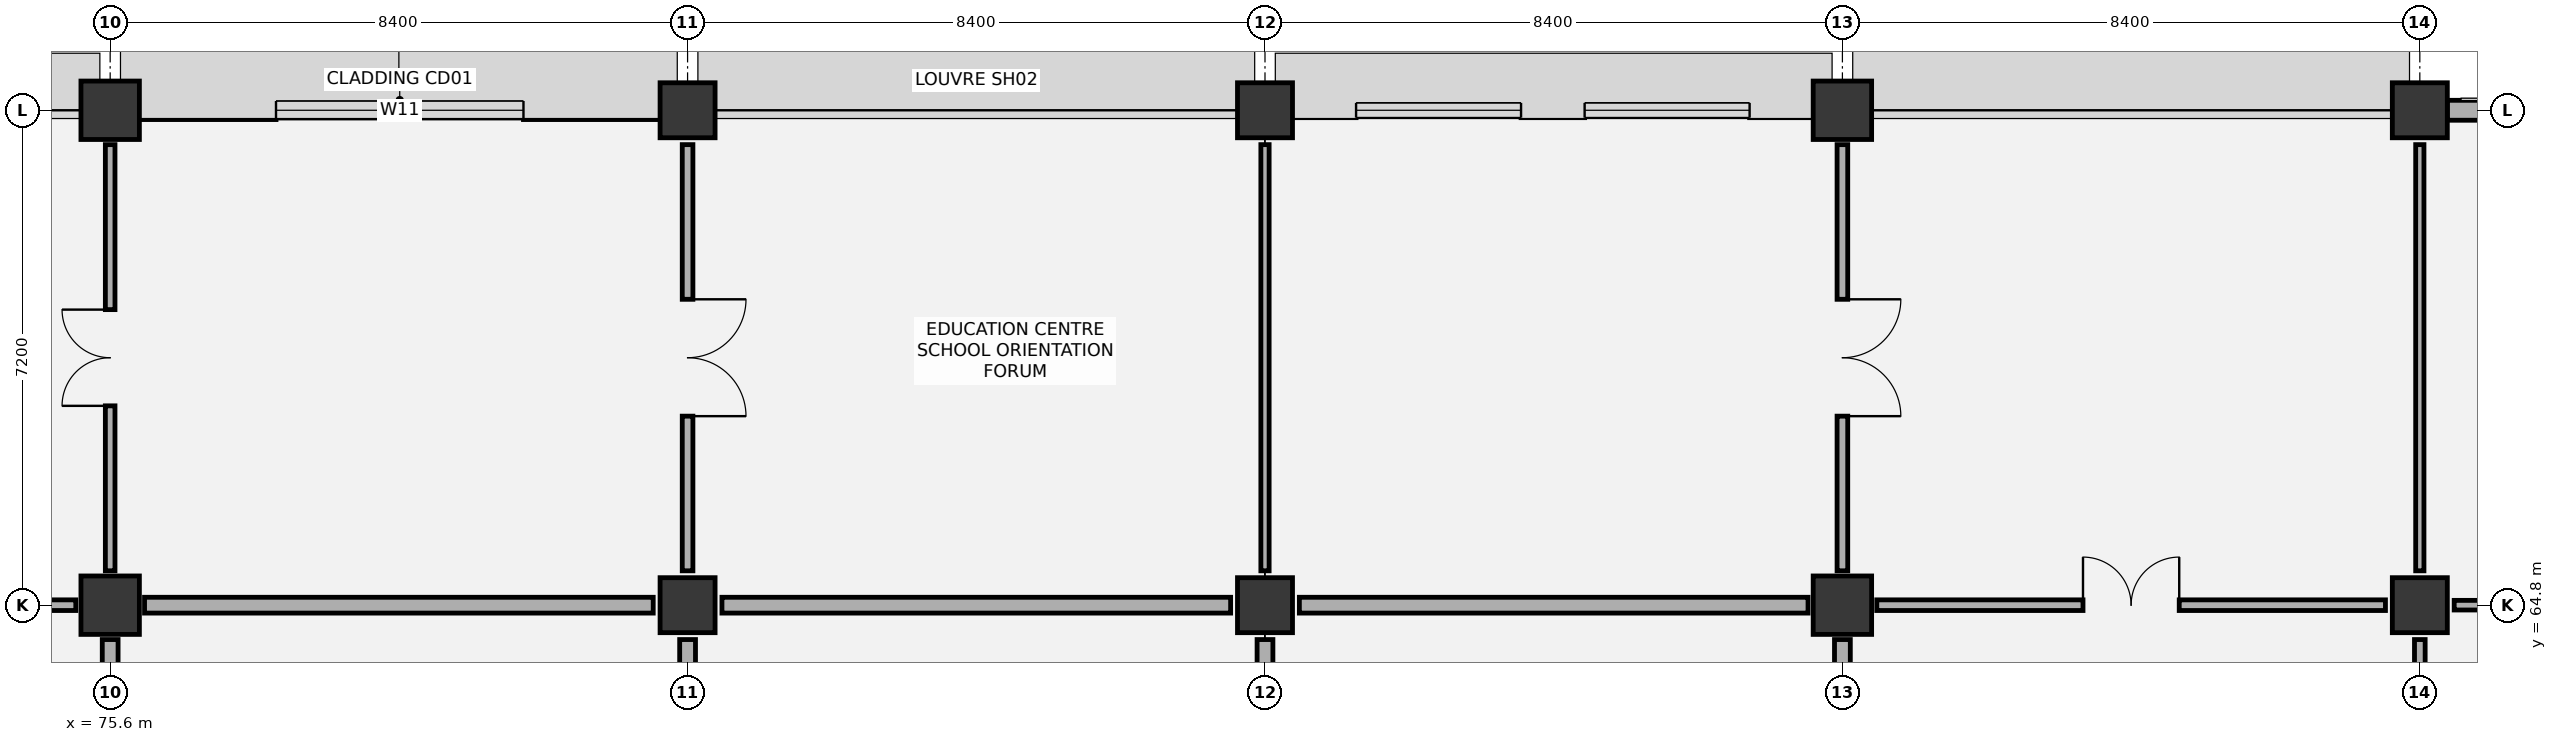
"""IFC4 building model, lengths in metres.
Left out: names, types, materials, properties, quantities, classifications, styles, units other than length and angle.
Written with IfcOpenShell. Run it as: python <this file> out.ifc"""

import sys

from ifc_helpers import new_model, si_unit, direction, frame, frame_2d, origin, origin_2d, place, context, subcontext, project, spatial, rectangle, extrude, element, fill, save


model = new_model("IFC4")
c1 = context("Model", 3, precision=1e-05, world=origin(), true_north=direction((0.0, 1.0)))
c2 = subcontext(c1, "Body", "Model", "MODEL_VIEW")
j1 = project(units=[si_unit("LENGTHUNIT", "METRE"), si_unit("PLANEANGLEUNIT", "RADIAN")], contexts=[c1])
p1 = place(None, origin())
s1 = spatial("IfcSite", under=j1, at=p1, CompositionType="ELEMENT")
p2 = place(p1, origin())
s2 = spatial("IfcBuilding", under=s1, at=p2, CompositionType="ELEMENT")
p3 = place(p2, frame((0.0, 0.0, 11.4)))
s3 = spatial("IfcBuildingStorey", under=s2, at=p3, CompositionType="ELEMENT", Elevation=11.4)
for number, where, z_axis, x_axis in (
    (1, (75.6, 64.8, 0.0), (0.0, 0.0, 1.0), (1.0, 0.0, 0.0)),
    (2, (75.6, 72.0, 0.0), (0.0, 0.0, 1.0), (1.0, 0.0, 0.0)),
):
    element("IfcColumn", number, at=place(p3, frame(where, z_axis=z_axis, x_axis=x_axis)), inside=s3, PredefinedType="COLUMN", context=c2, shape_type="SweptSolid", body=[
        extrude(rectangle(XDim=0.85, YDim=0.85, at=origin_2d()), origin(), (0.0, 0.0, 1.0), 5.4),
    ])
for number, where, z_axis, x_axis in (
    (3, (84.0, 64.8, 0.0), (0.0, 0.0, 1.0), (1.0, 0.0, 0.0)),
    (4, (84.0, 72.0, 0.0), (0.0, 0.0, 1.0), (1.0, 0.0, 0.0)),
    (5, (92.4, 64.8, 0.0), (0.0, 0.0, 1.0), (1.0, 0.0, 0.0)),
    (6, (92.4, 72.0, 0.0), (0.0, 0.0, 1.0), (1.0, 0.0, 0.0)),
):
    element("IfcColumn", number, at=place(p3, frame(where, z_axis=z_axis, x_axis=x_axis)), inside=s3, PredefinedType="COLUMN", context=c2, shape_type="SweptSolid", body=[
        extrude(rectangle(XDim=0.8, YDim=0.8, at=origin_2d()), origin(), (0.0, 0.0, 1.0), 5.4),
    ])
for number, where, z_axis, x_axis in (
    (7, (100.8, 64.8, 0.0), (0.0, 0.0, 1.0), (1.0, 0.0, 0.0)),
    (8, (100.8, 72.0, 0.0), (0.0, 0.0, 1.0), (1.0, 0.0, 0.0)),
):
    element("IfcColumn", number, at=place(p3, frame(where, z_axis=z_axis, x_axis=x_axis)), inside=s3, PredefinedType="COLUMN", context=c2, shape_type="SweptSolid", body=[
        extrude(rectangle(XDim=0.85, YDim=0.85, at=origin_2d()), origin(), (0.0, 0.0, 1.0), 5.4),
    ])
for number, where, z_axis, x_axis in (
    (9, (109.2, 64.8, 0.0), (0.0, 0.0, 1.0), (1.0, 0.0, 0.0)),
    (10, (109.2, 72.0, 0.0), (0.0, 0.0, 1.0), (1.0, 0.0, 0.0)),
):
    element("IfcColumn", number, at=place(p3, frame(where, z_axis=z_axis, x_axis=x_axis)), inside=s3, PredefinedType="COLUMN", context=c2, shape_type="SweptSolid", body=[
        extrude(rectangle(XDim=0.8, YDim=0.8, at=origin_2d()), origin(), (0.0, 0.0, 1.0), 5.4),
    ])
p4 = place(p3, frame((76.025, 72.0, 0.0), z_axis=(0.0, 0.0, 1.0), x_axis=(1.0, 0.0, 0.0)))
e11 = element("IfcWall", 11, at=p4, inside=s3, PredefinedType="SOLIDWALL", context=c2, shape_type="SweptSolid", body=[
    extrude(rectangle(XDim=7.575, YDim=0.27, at=frame_2d((3.788, 0.0))), origin(), (0.0, 0.0, 1.0), 4.445),
])
p5 = place(p4, frame((1.988, 0.0, 0.9)))
e12 = element("IfcOpeningElement", 12, at=p5, cuts=e11, PredefinedType="OPENING", context=c2, shape_type="SweptSolid", body=[
    extrude(rectangle(XDim=3.6, YDim=2.4, at=frame_2d((1.8, 1.2))), frame((0.0, 0.145, 0.0), z_axis=(0.0, -1.0, 0.0), x_axis=(1.0, 0.0, 0.0)), (0.0, 0.0, 1.0), 0.29),
])
p6 = place(p3, frame((92.8, 72.0, 0.0), z_axis=(0.0, 0.0, 1.0), x_axis=(1.0, 0.0, 0.0)))
e13 = element("IfcWall", 13, at=p6, inside=s3, PredefinedType="SOLIDWALL", context=c2, shape_type="SweptSolid", body=[
    extrude(rectangle(XDim=7.575, YDim=0.215, at=frame_2d((3.788, 0.0))), origin(), (0.0, 0.0, 1.0), 4.445),
])
p7 = place(p6, frame((0.925, 0.0, 0.9)))
e14 = element("IfcOpeningElement", 14, at=p7, cuts=e13, PredefinedType="OPENING", context=c2, shape_type="SweptSolid", body=[
    extrude(rectangle(XDim=2.4, YDim=2.1, at=frame_2d((1.2, 1.05))), frame((0.0, 0.117, 0.0), z_axis=(0.0, -1.0, 0.0), x_axis=(1.0, 0.0, 0.0)), (0.0, 0.0, 1.0), 0.235),
])
p8 = place(p6, frame((4.25, 0.0, 0.9)))
e15 = element("IfcOpeningElement", 15, at=p8, cuts=e13, PredefinedType="OPENING", context=c2, shape_type="SweptSolid", body=[
    extrude(rectangle(XDim=2.4, YDim=2.1, at=frame_2d((1.2, 1.05))), frame((0.0, 0.117, 0.0), z_axis=(0.0, -1.0, 0.0), x_axis=(1.0, 0.0, 0.0)), (0.0, 0.0, 1.0), 0.235),
])
p9 = place(p3, frame((109.6, 72.0, 0.0), z_axis=(0.0, 0.0, 1.0), x_axis=(1.0, 0.0, 0.0)))
e16 = element("IfcWall", 16, at=p9, inside=s3, PredefinedType="SOLIDWALL", context=c2, shape_type="SweptSolid", body=[
    extrude(rectangle(XDim=7.6, YDim=0.29, at=frame_2d((3.8, 0.0))), origin(), (0.0, 0.0, 1.0), 4.445),
])
p10 = place(p9, frame((2.3, 0.0, 0.9)))
e17 = element("IfcOpeningElement", 17, at=p10, cuts=e16, PredefinedType="OPENING", context=c2, shape_type="SweptSolid", body=[
    extrude(rectangle(XDim=3.0, YDim=2.1, at=frame_2d((1.5, 1.05))), frame((0.0, 0.155, 0.0), z_axis=(0.0, -1.0, 0.0), x_axis=(1.0, 0.0, 0.0)), (0.0, 0.0, 1.0), 0.31),
])
p11 = place(p3, frame((75.6, 58.1, 0.0), z_axis=(0.0, 0.0, 1.0), x_axis=(0.0, 1.0, 0.0)))
e18 = element("IfcWall", 18, at=p11, inside=s3, PredefinedType="PARTITIONING", context=c2, shape_type="SweptSolid", body=[
    extrude(rectangle(XDim=6.2, YDim=0.23, at=frame_2d((3.1, 0.0))), origin(), (0.0, 0.0, 1.0), 4.395),
])
p12 = place(p3, frame((67.7, 64.8, 0.0), z_axis=(0.0, 0.0, 1.0), x_axis=(1.0, 0.0, 0.0)))
e19 = element("IfcWall", 19, at=p12, inside=s3, PredefinedType="PARTITIONING", context=c2, shape_type="SweptSolid", body=[
    extrude(rectangle(XDim=7.4, YDim=0.155, at=frame_2d((3.7, 0.0))), origin(), (0.0, 0.0, 1.0), 4.345),
])
p13 = place(p12, frame((2.85, 0.0, 0.0)))
e20 = element("IfcOpeningElement", 20, at=p13, cuts=e19, PredefinedType="OPENING", context=c2, shape_type="SweptSolid", body=[
    extrude(rectangle(XDim=1.7, YDim=2.25, at=frame_2d((0.85, 1.125))), frame((0.0, 0.087, 0.0), z_axis=(0.0, -1.0, 0.0), x_axis=(1.0, 0.0, 0.0)), (0.0, 0.0, 1.0), 0.175),
])
p14 = place(p3, frame((75.6, 65.3, 0.0), z_axis=(0.0, 0.0, 1.0), x_axis=(0.0, 1.0, 0.0)))
e21 = element("IfcWall", 21, at=p14, inside=s3, PredefinedType="PARTITIONING", context=c2, shape_type="SweptSolid", body=[
    extrude(rectangle(XDim=6.2, YDim=0.14, at=frame_2d((3.1, 0.0))), origin(), (0.0, 0.0, 1.0), 4.805),
])
p15 = place(p14, frame((2.4, 0.0, 0.0)))
e22 = element("IfcOpeningElement", 22, at=p15, cuts=e21, PredefinedType="OPENING", context=c2, shape_type="SweptSolid", body=[
    extrude(rectangle(XDim=1.4, YDim=2.15, at=frame_2d((0.7, 1.075))), frame((0.0, 0.08, 0.0), z_axis=(0.0, -1.0, 0.0), x_axis=(1.0, 0.0, 0.0)), (0.0, 0.0, 1.0), 0.16),
])
p16 = place(p3, frame((84.0, 58.1, 0.0), z_axis=(0.0, 0.0, 1.0), x_axis=(0.0, 1.0, 0.0)))
e23 = element("IfcWall", 23, at=p16, inside=s3, PredefinedType="PARTITIONING", context=c2, shape_type="SweptSolid", body=[
    extrude(rectangle(XDim=6.2, YDim=0.23, at=frame_2d((3.1, 0.0))), origin(), (0.0, 0.0, 1.0), 4.805),
])
p17 = place(p16, frame((0.25, 0.0, 0.0)))
e24 = element("IfcOpeningElement", 24, at=p17, cuts=e23, PredefinedType="OPENING", context=c2, shape_type="SweptSolid", body=[
    extrude(rectangle(XDim=1.05, YDim=2.15, at=frame_2d((0.525, 1.075))), frame((0.0, 0.125, 0.0), z_axis=(0.0, -1.0, 0.0), x_axis=(1.0, 0.0, 0.0)), (0.0, 0.0, 1.0), 0.25),
])
p18 = place(p3, frame((76.1, 64.8, 0.0), z_axis=(0.0, 0.0, 1.0), x_axis=(1.0, 0.0, 0.0)))
e25 = element("IfcWall", 25, at=p18, inside=s3, PredefinedType="PARTITIONING", context=c2, shape_type="SweptSolid", body=[
    extrude(rectangle(XDim=7.4, YDim=0.23, at=frame_2d((3.7, 0.0))), origin(), (0.0, 0.0, 1.0), 4.345),
])
p19 = place(p3, frame((84.0, 65.3, 0.0), z_axis=(0.0, 0.0, 1.0), x_axis=(0.0, 1.0, 0.0)))
e26 = element("IfcWall", 26, at=p19, inside=s3, PredefinedType="PARTITIONING", context=c2, shape_type="SweptSolid", body=[
    extrude(rectangle(XDim=6.2, YDim=0.155, at=frame_2d((3.1, 0.0))), origin(), (0.0, 0.0, 1.0), 4.395),
])
p20 = place(p19, frame((2.25, 0.0, 0.0)))
e27 = element("IfcOpeningElement", 27, at=p20, cuts=e26, PredefinedType="OPENING", context=c2, shape_type="SweptSolid", body=[
    extrude(rectangle(XDim=1.7, YDim=2.25, at=frame_2d((0.85, 1.125))), frame((0.0, 0.087, 0.0), z_axis=(0.0, -1.0, 0.0), x_axis=(1.0, 0.0, 0.0)), (0.0, 0.0, 1.0), 0.175),
])
p21 = place(p3, frame((92.4, 58.1, 0.0), z_axis=(0.0, 0.0, 1.0), x_axis=(0.0, 1.0, 0.0)))
e28 = element("IfcWall", 28, at=p21, inside=s3, PredefinedType="PARTITIONING", context=c2, shape_type="SweptSolid", body=[
    extrude(rectangle(XDim=6.2, YDim=0.23, at=frame_2d((3.1, 0.0))), origin(), (0.0, 0.0, 1.0), 4.395),
])
p22 = place(p21, frame((0.25, 0.0, 0.0)))
e29 = element("IfcOpeningElement", 29, at=p22, cuts=e28, PredefinedType="OPENING", context=c2, shape_type="SweptSolid", body=[
    extrude(rectangle(XDim=1.05, YDim=2.15, at=frame_2d((0.525, 1.075))), frame((0.0, 0.125, 0.0), z_axis=(0.0, -1.0, 0.0), x_axis=(1.0, 0.0, 0.0)), (0.0, 0.0, 1.0), 0.25),
])
p23 = place(p3, frame((84.5, 64.8, 0.0), z_axis=(0.0, 0.0, 1.0), x_axis=(1.0, 0.0, 0.0)))
e30 = element("IfcWall", 30, at=p23, inside=s3, PredefinedType="PARTITIONING", context=c2, shape_type="SweptSolid", body=[
    extrude(rectangle(XDim=7.4, YDim=0.23, at=frame_2d((3.7, 0.0))), origin(), (0.0, 0.0, 1.0), 4.345),
])
p24 = place(p3, frame((92.4, 65.3, 0.0), z_axis=(0.0, 0.0, 1.0), x_axis=(0.0, 1.0, 0.0)))
e31 = element("IfcWall", 31, at=p24, inside=s3, PredefinedType="PARTITIONING", context=c2, shape_type="SweptSolid", body=[
    extrude(rectangle(XDim=6.2, YDim=0.12, at=frame_2d((3.1, 0.0))), origin(), (0.0, 0.0, 1.0), 4.595),
])
p25 = place(p3, frame((100.8, 58.1, 0.0), z_axis=(0.0, 0.0, 1.0), x_axis=(0.0, 1.0, 0.0)))
e32 = element("IfcWall", 32, at=p25, inside=s3, PredefinedType="PARTITIONING", context=c2, shape_type="SweptSolid", body=[
    extrude(rectangle(XDim=6.2, YDim=0.23, at=frame_2d((3.1, 0.0))), origin(), (0.0, 0.0, 1.0), 4.595),
])
p26 = place(p3, frame((92.9, 64.8, 0.0), z_axis=(0.0, 0.0, 1.0), x_axis=(1.0, 0.0, 0.0)))
e33 = element("IfcWall", 33, at=p26, inside=s3, PredefinedType="PARTITIONING", context=c2, shape_type="SweptSolid", body=[
    extrude(rectangle(XDim=7.4, YDim=0.23, at=frame_2d((3.7, 0.0))), origin(), (0.0, 0.0, 1.0), 4.345),
])
p27 = place(p3, frame((100.8, 65.3, 0.0), z_axis=(0.0, 0.0, 1.0), x_axis=(0.0, 1.0, 0.0)))
e34 = element("IfcWall", 34, at=p27, inside=s3, PredefinedType="PARTITIONING", context=c2, shape_type="SweptSolid", body=[
    extrude(rectangle(XDim=6.2, YDim=0.155, at=frame_2d((3.1, 0.0))), origin(), (0.0, 0.0, 1.0), 4.395),
])
p28 = place(p27, frame((2.25, 0.0, 0.0)))
e35 = element("IfcOpeningElement", 35, at=p28, cuts=e34, PredefinedType="OPENING", context=c2, shape_type="SweptSolid", body=[
    extrude(rectangle(XDim=1.7, YDim=2.25, at=frame_2d((0.85, 1.125))), frame((0.0, 0.087, 0.0), z_axis=(0.0, -1.0, 0.0), x_axis=(1.0, 0.0, 0.0)), (0.0, 0.0, 1.0), 0.175),
])
p29 = place(p3, frame((109.2, 58.1, 0.0), z_axis=(0.0, 0.0, 1.0), x_axis=(0.0, 1.0, 0.0)))
e36 = element("IfcWall", 36, at=p29, inside=s3, PredefinedType="PARTITIONING", context=c2, shape_type="SweptSolid", body=[
    extrude(rectangle(XDim=6.2, YDim=0.155, at=frame_2d((3.1, 0.0))), origin(), (0.0, 0.0, 1.0), 4.395),
])
p30 = place(p29, frame((2.25, 0.0, 0.0)))
e37 = element("IfcOpeningElement", 37, at=p30, cuts=e36, PredefinedType="OPENING", context=c2, shape_type="SweptSolid", body=[
    extrude(rectangle(XDim=1.7, YDim=2.25, at=frame_2d((0.85, 1.125))), frame((0.0, 0.087, 0.0), z_axis=(0.0, -1.0, 0.0), x_axis=(1.0, 0.0, 0.0)), (0.0, 0.0, 1.0), 0.175),
])
p31 = place(p3, frame((101.3, 64.8, 0.0), z_axis=(0.0, 0.0, 1.0), x_axis=(1.0, 0.0, 0.0)))
e38 = element("IfcWall", 38, at=p31, inside=s3, PredefinedType="PARTITIONING", context=c2, shape_type="SweptSolid", body=[
    extrude(rectangle(XDim=7.4, YDim=0.155, at=frame_2d((3.7, 0.0))), origin(), (0.0, 0.0, 1.0), 4.345),
])
p32 = place(p31, frame((3.0, 0.0, 0.0)))
e39 = element("IfcOpeningElement", 39, at=p32, cuts=e38, PredefinedType="OPENING", context=c2, shape_type="SweptSolid", body=[
    extrude(rectangle(XDim=1.4, YDim=2.15, at=frame_2d((0.7, 1.075))), frame((0.0, 0.087, 0.0), z_axis=(0.0, -1.0, 0.0), x_axis=(1.0, 0.0, 0.0)), (0.0, 0.0, 1.0), 0.175),
])
p33 = place(p3, frame((109.2, 65.3, 0.0), z_axis=(0.0, 0.0, 1.0), x_axis=(0.0, 1.0, 0.0)))
e40 = element("IfcWall", 40, at=p33, inside=s3, PredefinedType="PARTITIONING", context=c2, shape_type="SweptSolid", body=[
    extrude(rectangle(XDim=6.2, YDim=0.12, at=frame_2d((3.1, 0.0))), origin(), (0.0, 0.0, 1.0), 4.695),
])
p34 = place(p3, frame((109.7, 64.8, 0.0), z_axis=(0.0, 0.0, 1.0), x_axis=(1.0, 0.0, 0.0)))
e41 = element("IfcWall", 41, at=p34, inside=s3, PredefinedType="PARTITIONING", context=c2, shape_type="SweptSolid", body=[
    extrude(rectangle(XDim=7.4, YDim=0.14, at=frame_2d((3.7, 0.0))), origin(), (0.0, 0.0, 1.0), 4.345),
])
p35 = place(p34, frame((2.85, 0.0, 0.0)))
e42 = element("IfcOpeningElement", 42, at=p35, cuts=e41, PredefinedType="OPENING", context=c2, shape_type="SweptSolid", body=[
    extrude(rectangle(XDim=1.7, YDim=2.25, at=frame_2d((0.85, 1.125))), frame((0.0, 0.08, 0.0), z_axis=(0.0, -1.0, 0.0), x_axis=(1.0, 0.0, 0.0)), (0.0, 0.0, 1.0), 0.16),
])
p36 = place(p5, origin())
e43 = element("IfcWindow", 43, at=p36, inside=s3, PartitioningType="SINGLE_PANEL", PredefinedType="WINDOW", context=c2, shape_type="SweptSolid", body=[
    extrude(rectangle(XDim=3.6, YDim=2.4, at=frame_2d((1.8, 1.2))), frame((0.0, 0.03, 0.0), z_axis=(0.0, -1.0, 0.0), x_axis=(1.0, 0.0, 0.0)), (0.0, 0.0, 1.0), 0.06),
])
fill(e12, e43)
p37 = place(p7, origin())
e44 = element("IfcWindow", 44, at=p37, inside=s3, PartitioningType="SINGLE_PANEL", PredefinedType="WINDOW", context=c2, shape_type="SweptSolid", body=[
    extrude(rectangle(XDim=2.4, YDim=2.1, at=frame_2d((1.2, 1.05))), frame((0.0, 0.03, 0.0), z_axis=(0.0, -1.0, 0.0), x_axis=(1.0, 0.0, 0.0)), (0.0, 0.0, 1.0), 0.06),
])
fill(e14, e44)
p38 = place(p8, origin())
e45 = element("IfcWindow", 45, at=p38, inside=s3, PartitioningType="SINGLE_PANEL", PredefinedType="WINDOW", context=c2, shape_type="SweptSolid", body=[
    extrude(rectangle(XDim=2.4, YDim=2.1, at=frame_2d((1.2, 1.05))), frame((0.0, 0.03, 0.0), z_axis=(0.0, -1.0, 0.0), x_axis=(1.0, 0.0, 0.0)), (0.0, 0.0, 1.0), 0.06),
])
fill(e15, e45)
p39 = place(p15, origin())
e46 = element("IfcDoor", 46, at=p39, inside=s3, OperationType="DOUBLE_DOOR_SINGLE_SWING", PredefinedType="DOOR", context=c2, shape_type="SweptSolid", body=[
    extrude(rectangle(XDim=1.4, YDim=2.15, at=frame_2d((0.7, 1.075))), frame((0.0, 0.025, 0.0), z_axis=(0.0, -1.0, 0.0), x_axis=(1.0, 0.0, 0.0)), (0.0, 0.0, 1.0), 0.05),
])
fill(e22, e46)
p40 = place(p20, frame((1.7, 0.0, 0.0), z_axis=(0.0, 0.0, 1.0), x_axis=(-1.0, 0.0, 0.0)))
e47 = element("IfcDoor", 47, at=p40, inside=s3, OperationType="DOUBLE_DOOR_SINGLE_SWING", PredefinedType="DOOR", context=c2, shape_type="SweptSolid", body=[
    extrude(rectangle(XDim=1.7, YDim=2.25, at=frame_2d((0.85, 1.125))), frame((0.0, 0.025, 0.0), z_axis=(0.0, -1.0, 0.0), x_axis=(1.0, 0.0, 0.0)), (0.0, 0.0, 1.0), 0.05),
])
fill(e27, e47)
p41 = place(p28, frame((1.7, 0.0, 0.0), z_axis=(0.0, 0.0, 1.0), x_axis=(-1.0, 0.0, 0.0)))
e48 = element("IfcDoor", 48, at=p41, inside=s3, OperationType="DOUBLE_DOOR_SINGLE_SWING", PredefinedType="DOOR", context=c2, shape_type="SweptSolid", body=[
    extrude(rectangle(XDim=1.7, YDim=2.25, at=frame_2d((0.85, 1.125))), frame((0.0, 0.025, 0.0), z_axis=(0.0, -1.0, 0.0), x_axis=(1.0, 0.0, 0.0)), (0.0, 0.0, 1.0), 0.05),
])
fill(e35, e48)
p42 = place(p32, origin())
e49 = element("IfcDoor", 49, at=p42, inside=s3, OperationType="DOUBLE_DOOR_SINGLE_SWING", PredefinedType="DOOR", context=c2, shape_type="SweptSolid", body=[
    extrude(rectangle(XDim=1.4, YDim=2.15, at=frame_2d((0.7, 1.075))), frame((0.0, 0.025, 0.0), z_axis=(0.0, -1.0, 0.0), x_axis=(1.0, 0.0, 0.0)), (0.0, 0.0, 1.0), 0.05),
])
fill(e39, e49)
save(model, sys.argv[1])
